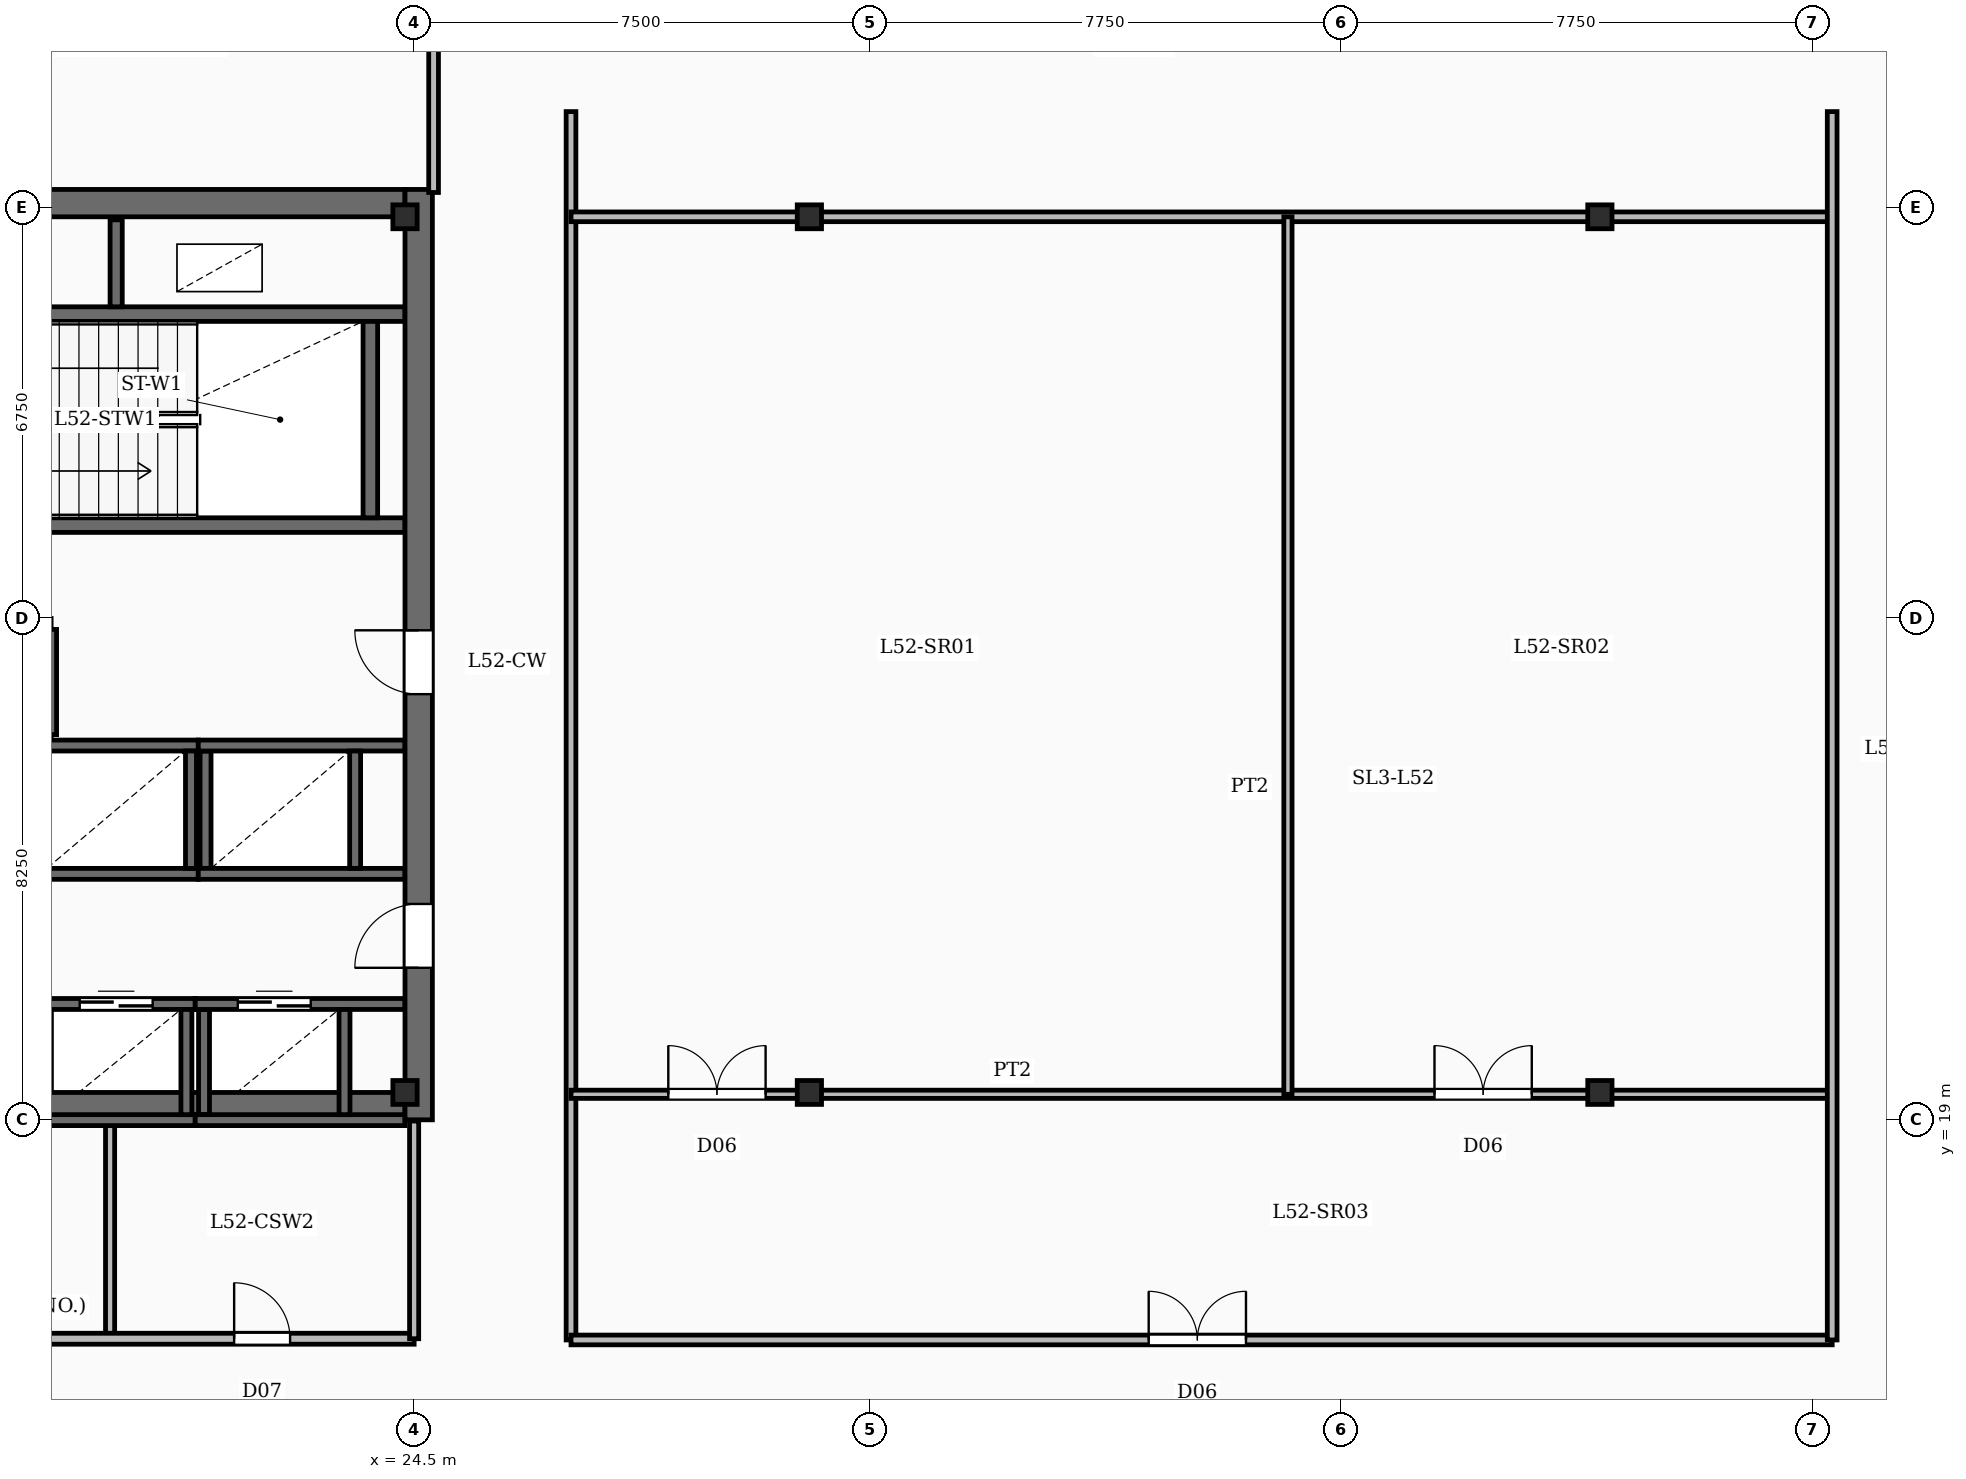
"""IFC4 building model, lengths in metres.
Left out: names, types, materials, properties, quantities, classifications, styles, units other than length and angle.
Written with IfcOpenShell. Run it as: python <this file> out.ifc"""

import sys

from ifc_helpers import new_model, si_unit, direction, frame, frame_2d, origin, origin_2d, place, context, subcontext, project, spatial, rectangle, i_section, extrude, element, fill, save


model = new_model("IFC4")
c1 = context("Model", 3, precision=1e-05, world=origin(), true_north=direction((0.0, 1.0)))
c2 = subcontext(c1, "Body", "Model", "MODEL_VIEW")
j1 = project(units=[si_unit("LENGTHUNIT", "METRE"), si_unit("PLANEANGLEUNIT", "RADIAN")], contexts=[c1])
p1 = place(None, origin())
s1 = spatial("IfcSite", under=j1, at=p1, CompositionType="ELEMENT")
p2 = place(p1, origin())
s2 = spatial("IfcBuilding", under=s1, at=p2, CompositionType="ELEMENT")
p3 = place(p2, frame((0.0, 0.0, 216.15)))
s3 = spatial("IfcBuildingStorey", under=s2, at=p3, CompositionType="ELEMENT", Elevation=216.15)
p4 = place(p3, frame((24.575, 19.0, -0.45), z_axis=(0.0, 0.0, 1.0), x_axis=(0.0, 1.0, 0.0)))
e1 = element("IfcWall", 1, at=p4, inside=s3, PredefinedType="SHEAR", context=c2, shape_type="SweptSolid", body=[
    extrude(rectangle(XDim=15.3, YDim=0.45, at=frame_2d((7.65, 0.0))), origin(), (0.0, 0.0, 1.0), 4.98),
])
p5 = place(p4, frame((2.5, 0.0, 0.45)))
e2 = element("IfcOpeningElement", 2, at=p5, cuts=e1, PredefinedType="OPENING", context=c2, shape_type="SweptSolid", body=[
    extrude(rectangle(XDim=1.05, YDim=2.15, at=frame_2d((0.525, 1.075))), frame((0.0, 0.235, 0.0), z_axis=(0.0, -1.0, 0.0), x_axis=(1.0, 0.0, 0.0)), (0.0, 0.0, 1.0), 0.47),
])
p6 = place(p4, frame((7.0, 0.0, 0.45)))
e3 = element("IfcOpeningElement", 3, at=p6, cuts=e1, PredefinedType="OPENING", context=c2, shape_type="SweptSolid", body=[
    extrude(rectangle(XDim=1.05, YDim=2.15, at=frame_2d((0.525, 1.075))), frame((0.0, 0.235, 0.0), z_axis=(0.0, -1.0, 0.0), x_axis=(1.0, 0.0, 0.0)), (0.0, 0.0, 1.0), 0.47),
])
for number, where, z_axis, x_axis in (
    (4, (14.55, 19.225, -0.45), (0.0, 0.0, 1.0), (1.0, 0.0, 0.0)),
    (5, (14.55, 34.075, -0.45), (0.0, 0.0, 1.0), (1.0, 0.0, 0.0)),
):
    element("IfcWall", number, at=place(p3, frame(where, z_axis=z_axis, x_axis=x_axis)), inside=s3, PredefinedType="SHEAR", context=c2, shape_type="SweptSolid", body=[
        extrude(rectangle(XDim=9.8, YDim=0.45, at=frame_2d((4.9, 0.0))), origin(), (0.0, 0.0, 1.0), 4.98),
    ])
for number, where, z_axis, x_axis in (
    (6, (24.35, 19.45, -0.45), (0.0, 0.0, 1.0), (1.0, 0.0, 0.0)),
    (7, (24.35, 33.85, -0.45), (0.0, 0.0, 1.0), (1.0, 0.0, 0.0)),
    (8, (31.0, 19.45, -0.45), (0.0, 0.0, 1.0), (1.0, 0.0, 0.0)),
    (9, (44.0, 19.45, -0.45), (0.0, 0.0, 1.0), (1.0, 0.0, 0.0)),
    (10, (31.0, 33.85, -0.45), (0.0, 0.0, 1.0), (1.0, 0.0, 0.0)),
    (11, (44.0, 33.85, -0.45), (0.0, 0.0, 1.0), (1.0, 0.0, 0.0)),
):
    element("IfcColumn", number, at=place(p3, frame(where, z_axis=z_axis, x_axis=x_axis)), inside=s3, PredefinedType="COLUMN", context=c2, shape_type="SweptSolid", body=[
        extrude(i_section(OverallWidth=0.399, OverallDepth=0.393, WebThickness=0.023, FlangeThickness=0.037, FilletRadius=0.02, at=origin_2d()), origin(), (0.0, 0.0, 1.0), 4.98),
    ])
p7 = place(p3, frame((24.35, 28.78, 0.0), z_axis=(0.0, 0.0, 1.0), x_axis=(-1.0, 0.0, 0.0)))
e12 = element("IfcWall", 12, at=p7, inside=s3, PredefinedType="SOLIDWALL", context=c2, shape_type="SweptSolid", body=[
    extrude(rectangle(XDim=9.8, YDim=0.24, at=frame_2d((4.9, 0.0))), origin(), (0.0, 0.0, 1.0), 4.53),
])
p8 = place(p7, frame((7.83, 0.0, 0.0)))
e13 = element("IfcOpeningElement", 13, at=p8, cuts=e12, PredefinedType="OPENING", context=c2, shape_type="SweptSolid", body=[
    extrude(rectangle(XDim=1.1, YDim=2.15, at=frame_2d((0.55, 1.075))), frame((0.0, 0.13, 0.0), z_axis=(0.0, -1.0, 0.0), x_axis=(1.0, 0.0, 0.0)), (0.0, 0.0, 1.0), 0.26),
])
p9 = place(p3, frame((14.55, 32.25, 0.0), z_axis=(0.0, 0.0, 1.0), x_axis=(1.0, 0.0, 0.0)))
e14 = element("IfcWall", 14, at=p9, inside=s3, PredefinedType="SOLIDWALL", context=c2, shape_type="SweptSolid", body=[
    extrude(rectangle(XDim=9.8, YDim=0.24, at=frame_2d((4.9, 0.0))), origin(), (0.0, 0.0, 1.0), 4.53),
])
p10 = place(p3, frame((23.78, 28.9, 0.0), z_axis=(0.0, 0.0, 1.0), x_axis=(0.0, 1.0, 0.0)))
e15 = element("IfcWall", 15, at=p10, inside=s3, PredefinedType="SOLIDWALL", context=c2, shape_type="SweptSolid", body=[
    extrude(rectangle(XDim=3.23, YDim=0.24, at=frame_2d((1.615, 0.0))), origin(), (0.0, 0.0, 1.0), 4.53),
])
p11 = place(p3, frame((19.6, 32.37, 0.0), z_axis=(0.0, 0.0, 1.0), x_axis=(0.0, 1.0, 0.0)))
e16 = element("IfcWall", 16, at=p11, inside=s3, PredefinedType="SOLIDWALL", context=c2, shape_type="SweptSolid", body=[
    extrude(rectangle(XDim=1.43, YDim=0.2, at=frame_2d((0.715, 0.0))), origin(), (0.0, 0.0, 1.0), 4.53),
])
p12 = place(p3, frame((18.3, 20.905, 0.0), z_axis=(0.0, 0.0, 1.0), x_axis=(1.0, 0.0, 0.0)))
e17 = element("IfcWall", 17, at=p12, inside=s3, PredefinedType="SOLIDWALL", context=c2, shape_type="SweptSolid", body=[
    extrude(rectangle(XDim=2.6, YDim=0.18, at=frame_2d((1.3, 0.0))), origin(), (0.0, 0.0, 1.0), 4.53),
])
p13 = place(p12, frame((0.7, 0.0, 0.0)))
e18 = element("IfcOpeningElement", 18, at=p13, cuts=e17, PredefinedType="OPENING", context=c2, shape_type="SweptSolid", body=[
    extrude(rectangle(XDim=1.2, YDim=2.2, at=frame_2d((0.6, 1.1))), frame((0.0, 0.1, 0.0), z_axis=(0.0, -1.0, 0.0), x_axis=(1.0, 0.0, 0.0)), (0.0, 0.0, 1.0), 0.2),
])
p14 = place(p3, frame((18.3, 18.995, 0.0), z_axis=(0.0, 0.0, 1.0), x_axis=(1.0, 0.0, 0.0)))
e19 = element("IfcWall", 19, at=p14, inside=s3, PredefinedType="SOLIDWALL", context=c2, shape_type="SweptSolid", body=[
    extrude(rectangle(XDim=2.6, YDim=0.18, at=frame_2d((1.3, 0.0))), origin(), (0.0, 0.0, 1.0), 4.53),
])
p15 = place(p3, frame((20.755, 19.085, 0.0), z_axis=(0.0, 0.0, 1.0), x_axis=(0.0, 1.0, 0.0)))
e20 = element("IfcWall", 20, at=p15, inside=s3, PredefinedType="SOLIDWALL", context=c2, shape_type="SweptSolid", body=[
    extrude(rectangle(XDim=1.73, YDim=0.18, at=frame_2d((0.865, 0.0))), origin(), (0.0, 0.0, 1.0), 4.53),
])
p16 = place(p3, frame((20.9, 20.905, 0.0), z_axis=(0.0, 0.0, 1.0), x_axis=(1.0, 0.0, 0.0)))
e21 = element("IfcWall", 21, at=p16, inside=s3, PredefinedType="SOLIDWALL", context=c2, shape_type="SweptSolid", body=[
    extrude(rectangle(XDim=3.45, YDim=0.18, at=frame_2d((1.725, 0.0))), origin(), (0.0, 0.0, 1.0), 4.53),
])
p17 = place(p16, frame((0.7, 0.0, 0.0)))
e22 = element("IfcOpeningElement", 22, at=p17, cuts=e21, PredefinedType="OPENING", context=c2, shape_type="SweptSolid", body=[
    extrude(rectangle(XDim=1.2, YDim=2.2, at=frame_2d((0.6, 1.1))), frame((0.0, 0.1, 0.0), z_axis=(0.0, -1.0, 0.0), x_axis=(1.0, 0.0, 0.0)), (0.0, 0.0, 1.0), 0.2),
])
p18 = place(p3, frame((20.9, 18.995, 0.0), z_axis=(0.0, 0.0, 1.0), x_axis=(1.0, 0.0, 0.0)))
e23 = element("IfcWall", 23, at=p18, inside=s3, PredefinedType="SOLIDWALL", context=c2, shape_type="SweptSolid", body=[
    extrude(rectangle(XDim=3.45, YDim=0.18, at=frame_2d((1.725, 0.0))), origin(), (0.0, 0.0, 1.0), 4.53),
])
for number, where, z_axis, x_axis in (
    (24, (21.045, 19.085, 0.0), (0.0, 0.0, 1.0), (0.0, 1.0, 0.0)),
    (25, (23.355, 19.085, 0.0), (0.0, 0.0, 1.0), (0.0, 1.0, 0.0)),
):
    element("IfcWall", number, at=place(p3, frame(where, z_axis=z_axis, x_axis=x_axis)), inside=s3, PredefinedType="SOLIDWALL", context=c2, shape_type="SweptSolid", body=[
        extrude(rectangle(XDim=1.73, YDim=0.18, at=frame_2d((0.865, 0.0))), origin(), (0.0, 0.0, 1.0), 4.53),
    ])
for number, where, z_axis, x_axis in (
    (26, (18.262, 25.155, 0.0), (0.0, 0.0, 1.0), (1.0, 0.0, 0.0)),
    (27, (18.262, 23.045, 0.0), (0.0, 0.0, 1.0), (1.0, 0.0, 0.0)),
):
    element("IfcWall", number, at=place(p3, frame(where, z_axis=z_axis, x_axis=x_axis)), inside=s3, PredefinedType="SOLIDWALL", context=c2, shape_type="SweptSolid", body=[
        extrude(rectangle(XDim=2.688, YDim=0.18, at=frame_2d((1.344, 0.0))), origin(), (0.0, 0.0, 1.0), 4.53),
    ])
p19 = place(p3, frame((20.83, 23.135, 0.0), z_axis=(0.0, 0.0, 1.0), x_axis=(0.0, 1.0, 0.0)))
e28 = element("IfcWall", 28, at=p19, inside=s3, PredefinedType="SOLIDWALL", context=c2, shape_type="SweptSolid", body=[
    extrude(rectangle(XDim=1.93, YDim=0.18, at=frame_2d((0.965, 0.0))), origin(), (0.0, 0.0, 1.0), 4.53),
])
for number, where, z_axis, x_axis in (
    (29, (20.95, 25.155, 0.0), (0.0, 0.0, 1.0), (1.0, 0.0, 0.0)),
    (30, (20.95, 23.045, 0.0), (0.0, 0.0, 1.0), (1.0, 0.0, 0.0)),
):
    element("IfcWall", number, at=place(p3, frame(where, z_axis=z_axis, x_axis=x_axis)), inside=s3, PredefinedType="SOLIDWALL", context=c2, shape_type="SweptSolid", body=[
        extrude(rectangle(XDim=3.4, YDim=0.18, at=frame_2d((1.7, 0.0))), origin(), (0.0, 0.0, 1.0), 4.53),
    ])
for number, where, z_axis, x_axis in (
    (31, (21.07, 23.135, 0.0), (0.0, 0.0, 1.0), (0.0, 1.0, 0.0)),
    (32, (23.53, 23.135, 0.0), (0.0, 0.0, 1.0), (0.0, 1.0, 0.0)),
):
    element("IfcWall", number, at=place(p3, frame(where, z_axis=z_axis, x_axis=x_axis)), inside=s3, PredefinedType="SOLIDWALL", context=c2, shape_type="SweptSolid", body=[
        extrude(rectangle(XDim=1.93, YDim=0.18, at=frame_2d((0.965, 0.0))), origin(), (0.0, 0.0, 1.0), 4.53),
    ])
p20 = place(p3, frame((18.53, 25.335, 0.0), z_axis=(0.0, 0.0, 1.0), x_axis=(0.0, 1.0, 0.0)))
e33 = element("IfcWall", 33, at=p20, inside=s3, PredefinedType="SOLIDWALL", context=c2, shape_type="SweptSolid", body=[
    extrude(rectangle(XDim=1.73, YDim=0.18, at=frame_2d((0.865, 0.0))), origin(), (0.0, 0.0, 1.0), 4.53),
])
p21 = place(p3, frame((19.5, 15.4, 0.0), z_axis=(0.0, 0.0, 1.0), x_axis=(0.0, 1.0, 0.0)))
e34 = element("IfcWall", 34, at=p21, inside=s3, PredefinedType="PARTITIONING", context=c2, shape_type="SweptSolid", body=[
    extrude(rectangle(XDim=3.58, YDim=0.15, at=frame_2d((1.79, 0.0))), origin(), (0.0, 0.0, 1.0), 3.59),
])
p22 = place(p3, frame((14.6, 15.4, 0.0), z_axis=(0.0, 0.0, 1.0), x_axis=(1.0, 0.0, 0.0)))
e35 = element("IfcWall", 35, at=p22, inside=s3, PredefinedType="PARTITIONING", context=c2, shape_type="SweptSolid", body=[
    extrude(rectangle(XDim=9.9, YDim=0.18, at=frame_2d((4.95, 0.0))), origin(), (0.0, 0.0, 1.0), 3.59),
])
p23 = place(p22, frame((1.99, 0.0, 0.0)))
e36 = element("IfcOpeningElement", 36, at=p23, cuts=e35, PredefinedType="OPENING", context=c2, shape_type="SweptSolid", body=[
    extrude(rectangle(XDim=0.92, YDim=2.1, at=frame_2d((0.46, 1.05))), frame((0.0, 0.1, 0.0), z_axis=(0.0, -1.0, 0.0), x_axis=(1.0, 0.0, 0.0)), (0.0, 0.0, 1.0), 0.2),
])
p24 = place(p22, frame((6.94, 0.0, 0.0)))
e37 = element("IfcOpeningElement", 37, at=p24, cuts=e35, PredefinedType="OPENING", context=c2, shape_type="SweptSolid", body=[
    extrude(rectangle(XDim=0.92, YDim=2.1, at=frame_2d((0.46, 1.05))), frame((0.0, 0.1, 0.0), z_axis=(0.0, -1.0, 0.0), x_axis=(1.0, 0.0, 0.0)), (0.0, 0.0, 1.0), 0.2),
])
p25 = place(p3, frame((24.5, 15.4, 0.0), z_axis=(0.0, 0.0, 1.0), x_axis=(0.0, 1.0, 0.0)))
e38 = element("IfcWall", 38, at=p25, inside=s3, PredefinedType="PARTITIONING", context=c2, shape_type="SweptSolid", body=[
    extrude(rectangle(XDim=3.58, YDim=0.15, at=frame_2d((1.79, 0.0))), origin(), (0.0, 0.0, 1.0), 3.59),
])
p26 = place(p3, frame((27.08, 19.42, 0.0), z_axis=(0.0, 0.0, 1.0), x_axis=(1.0, 0.0, 0.0)))
e39 = element("IfcWall", 39, at=p26, inside=s3, PredefinedType="PARTITIONING", context=c2, shape_type="SweptSolid", body=[
    extrude(rectangle(XDim=20.74, YDim=0.135, at=frame_2d((10.37, 0.0))), origin(), (0.0, 0.0, 1.0), 3.59),
])
p27 = place(p26, frame((1.6, 0.0, 0.0)))
e40 = element("IfcOpeningElement", 40, at=p27, cuts=e39, PredefinedType="OPENING", context=c2, shape_type="SweptSolid", body=[
    extrude(rectangle(XDim=1.6, YDim=2.15, at=frame_2d((0.8, 1.075))), frame((0.0, 0.077, 0.0), z_axis=(0.0, -1.0, 0.0), x_axis=(1.0, 0.0, 0.0)), (0.0, 0.0, 1.0), 0.155),
])
p28 = place(p26, frame((14.2, 0.0, 0.0)))
e41 = element("IfcOpeningElement", 41, at=p28, cuts=e39, PredefinedType="OPENING", context=c2, shape_type="SweptSolid", body=[
    extrude(rectangle(XDim=1.6, YDim=2.15, at=frame_2d((0.8, 1.075))), frame((0.0, 0.077, 0.0), z_axis=(0.0, -1.0, 0.0), x_axis=(1.0, 0.0, 0.0)), (0.0, 0.0, 1.0), 0.155),
])
p29 = place(p3, frame((27.08, 33.85, 0.0), z_axis=(0.0, 0.0, 1.0), x_axis=(1.0, 0.0, 0.0)))
e42 = element("IfcWall", 42, at=p29, inside=s3, PredefinedType="PARTITIONING", context=c2, shape_type="SweptSolid", body=[
    extrude(rectangle(XDim=20.74, YDim=0.16, at=frame_2d((10.37, 0.0))), origin(), (0.0, 0.0, 1.0), 3.59),
])
p30 = place(p3, frame((38.87, 19.42, 0.0), z_axis=(0.0, 0.0, 1.0), x_axis=(0.0, 1.0, 0.0)))
e43 = element("IfcWall", 43, at=p30, inside=s3, PredefinedType="PARTITIONING", context=c2, shape_type="SweptSolid", body=[
    extrude(rectangle(XDim=14.43, YDim=0.135, at=frame_2d((7.215, 0.0))), origin(), (0.0, 0.0, 1.0), 3.59),
])
p31 = place(p3, frame((27.08, 15.38, 0.0), z_axis=(0.0, 0.0, 1.0), x_axis=(1.0, 0.0, 0.0)))
e44 = element("IfcWall", 44, at=p31, inside=s3, PredefinedType="PARTITIONING", context=c2, shape_type="SweptSolid", body=[
    extrude(rectangle(XDim=20.74, YDim=0.16, at=frame_2d((10.37, 0.0))), origin(), (0.0, 0.0, 1.0), 3.59),
])
p32 = place(p31, frame((9.5, 0.0, 0.0)))
e45 = element("IfcOpeningElement", 45, at=p32, cuts=e44, PredefinedType="OPENING", context=c2, shape_type="SweptSolid", body=[
    extrude(rectangle(XDim=1.6, YDim=2.15, at=frame_2d((0.8, 1.075))), frame((0.0, 0.09, 0.0), z_axis=(0.0, -1.0, 0.0), x_axis=(1.0, 0.0, 0.0)), (0.0, 0.0, 1.0), 0.18),
])
for number, where, z_axis, x_axis in (
    (46, (27.08, 15.38, 0.0), (0.0, 0.0, 1.0), (0.0, 1.0, 0.0)),
    (47, (47.82, 15.38, 0.0), (0.0, 0.0, 1.0), (0.0, 1.0, 0.0)),
):
    element("IfcWall", number, at=place(p3, frame(where, z_axis=z_axis, x_axis=x_axis)), inside=s3, PredefinedType="PARTITIONING", context=c2, shape_type="SweptSolid", body=[
        extrude(rectangle(XDim=20.2, YDim=0.16, at=frame_2d((10.1, 0.0))), origin(), (0.0, 0.0, 1.0), 3.59),
    ])
p33 = place(p3, frame((24.82, 34.25, 0.0), z_axis=(0.0, 0.0, 1.0), x_axis=(0.0, 1.0, 0.0)))
e48 = element("IfcWall", 48, at=p33, inside=s3, PredefinedType="PARTITIONING", context=c2, shape_type="SweptSolid", body=[
    extrude(rectangle(XDim=3.57, YDim=0.16, at=frame_2d((1.785, 0.0))), origin(), (0.0, 0.0, 1.0), 3.59),
])
p34 = place(p5, origin())
e49 = element("IfcDoor", 49, at=p34, inside=s3, OperationType="SINGLE_SWING_LEFT", PredefinedType="DOOR", context=c2, shape_type="SweptSolid", body=[
    extrude(rectangle(XDim=1.05, YDim=2.15, at=frame_2d((0.525, 1.075))), frame((0.0, 0.025, 0.0), z_axis=(0.0, -1.0, 0.0), x_axis=(1.0, 0.0, 0.0)), (0.0, 0.0, 1.0), 0.05),
])
fill(e2, e49)
p35 = place(p6, origin())
e50 = element("IfcDoor", 50, at=p35, inside=s3, OperationType="SINGLE_SWING_RIGHT", PredefinedType="DOOR", context=c2, shape_type="SweptSolid", body=[
    extrude(rectangle(XDim=1.05, YDim=2.15, at=frame_2d((0.525, 1.075))), frame((0.0, 0.025, 0.0), z_axis=(0.0, -1.0, 0.0), x_axis=(1.0, 0.0, 0.0)), (0.0, 0.0, 1.0), 0.05),
])
fill(e3, e50)
p36 = place(p13, origin())
e51 = element("IfcDoor", 51, at=p36, inside=s3, OperationType="DOUBLE_DOOR_SLIDING", PredefinedType="DOOR", context=c2, shape_type="SweptSolid", body=[
    extrude(rectangle(XDim=1.2, YDim=2.2, at=frame_2d((0.6, 1.1))), frame((0.0, 0.025, 0.0), z_axis=(0.0, -1.0, 0.0), x_axis=(1.0, 0.0, 0.0)), (0.0, 0.0, 1.0), 0.05),
])
fill(e18, e51)
p37 = place(p17, origin())
e52 = element("IfcDoor", 52, at=p37, inside=s3, OperationType="DOUBLE_DOOR_SLIDING", PredefinedType="DOOR", context=c2, shape_type="SweptSolid", body=[
    extrude(rectangle(XDim=1.2, YDim=2.2, at=frame_2d((0.6, 1.1))), frame((0.0, 0.025, 0.0), z_axis=(0.0, -1.0, 0.0), x_axis=(1.0, 0.0, 0.0)), (0.0, 0.0, 1.0), 0.05),
])
fill(e22, e52)
p38 = place(p24, origin())
e53 = element("IfcDoor", 53, at=p38, inside=s3, OperationType="SINGLE_SWING_LEFT", PredefinedType="DOOR", context=c2, shape_type="SweptSolid", body=[
    extrude(rectangle(XDim=0.92, YDim=2.1, at=frame_2d((0.46, 1.05))), frame((0.0, 0.025, 0.0), z_axis=(0.0, -1.0, 0.0), x_axis=(1.0, 0.0, 0.0)), (0.0, 0.0, 1.0), 0.05),
])
fill(e37, e53)
p39 = place(p27, origin())
e54 = element("IfcDoor", 54, at=p39, inside=s3, OperationType="DOUBLE_DOOR_SINGLE_SWING", PredefinedType="DOOR", context=c2, shape_type="SweptSolid", body=[
    extrude(rectangle(XDim=1.6, YDim=2.15, at=frame_2d((0.8, 1.075))), frame((0.0, 0.025, 0.0), z_axis=(0.0, -1.0, 0.0), x_axis=(1.0, 0.0, 0.0)), (0.0, 0.0, 1.0), 0.05),
])
fill(e40, e54)
p40 = place(p28, origin())
e55 = element("IfcDoor", 55, at=p40, inside=s3, OperationType="DOUBLE_DOOR_SINGLE_SWING", PredefinedType="DOOR", context=c2, shape_type="SweptSolid", body=[
    extrude(rectangle(XDim=1.6, YDim=2.15, at=frame_2d((0.8, 1.075))), frame((0.0, 0.025, 0.0), z_axis=(0.0, -1.0, 0.0), x_axis=(1.0, 0.0, 0.0)), (0.0, 0.0, 1.0), 0.05),
])
fill(e41, e55)
p41 = place(p32, origin())
e56 = element("IfcDoor", 56, at=p41, inside=s3, OperationType="DOUBLE_DOOR_SINGLE_SWING", PredefinedType="DOOR", context=c2, shape_type="SweptSolid", body=[
    extrude(rectangle(XDim=1.6, YDim=2.15, at=frame_2d((0.8, 1.075))), frame((0.0, 0.025, 0.0), z_axis=(0.0, -1.0, 0.0), x_axis=(1.0, 0.0, 0.0)), (0.0, 0.0, 1.0), 0.05),
])
fill(e45, e56)
save(model, sys.argv[1])
